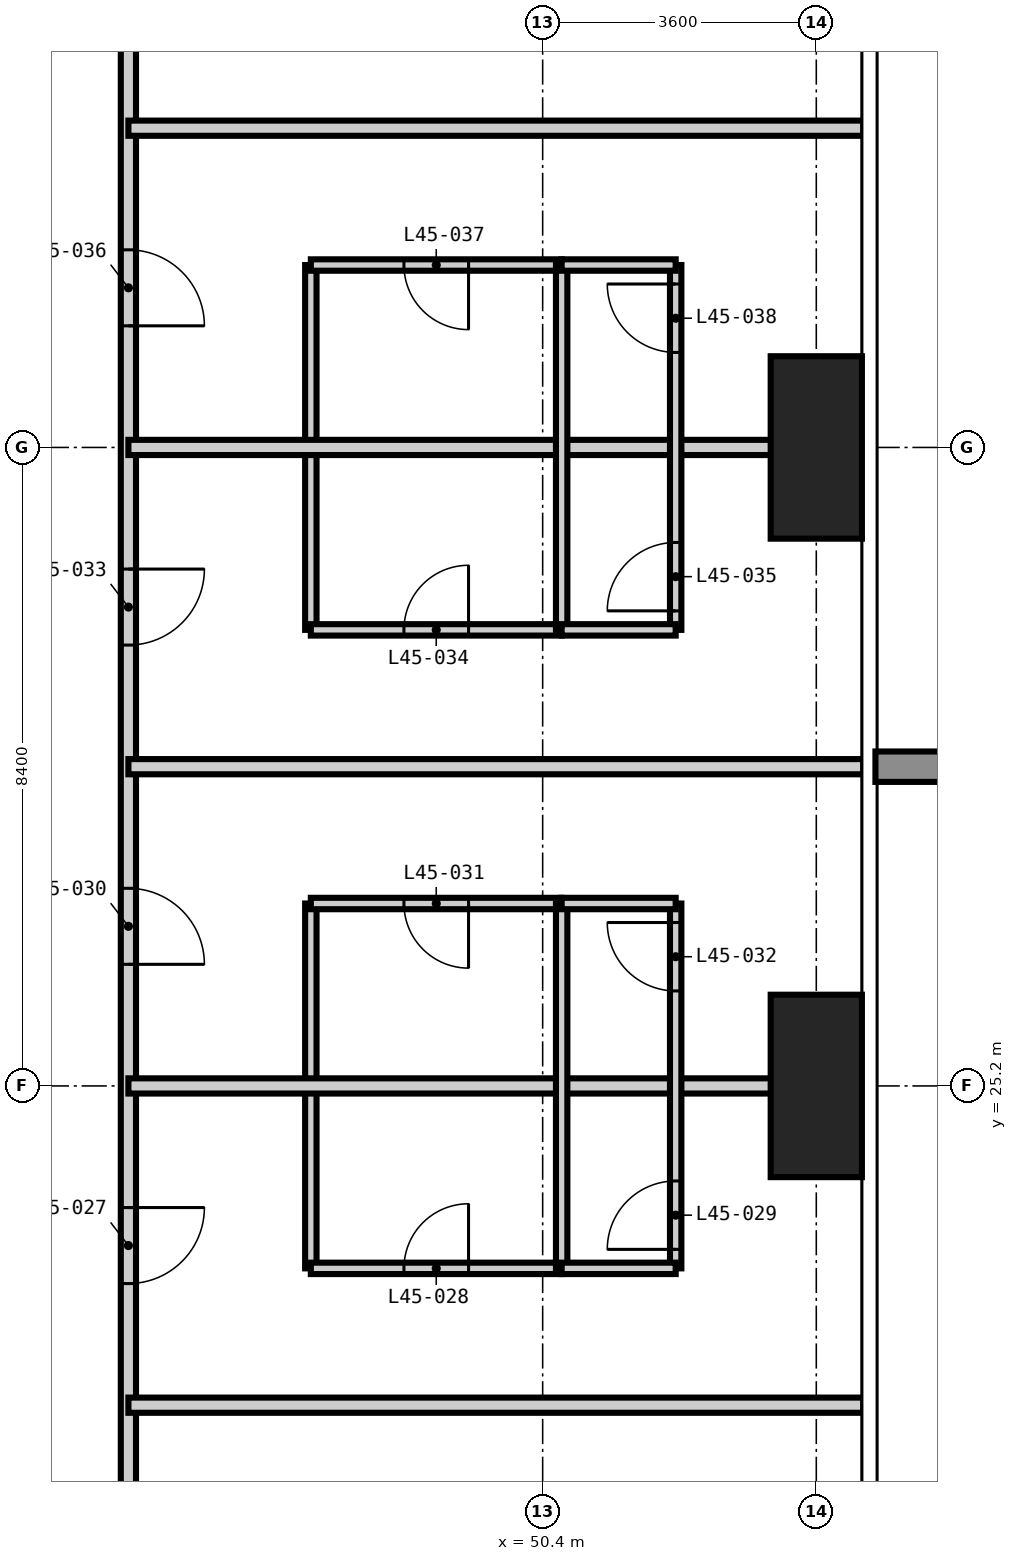
"""IFC4 building model, lengths in metres.
Left out: names, types, materials, properties, quantities, classifications, styles, units other than length and angle.
Written with IfcOpenShell. Run it as: python <this file> out.ifc"""

import sys

from ifc_helpers import new_model, si_unit, direction, frame, frame_2d, origin, origin_2d, place, context, subcontext, project, spatial, rectangle, extrude, element, fill, save


model = new_model("IFC4")
c1 = context("Model", 3, precision=1e-05, world=origin(), true_north=direction((0.0, 1.0)))
c2 = subcontext(c1, "Body", "Model", "MODEL_VIEW")
j1 = project(units=[si_unit("LENGTHUNIT", "METRE"), si_unit("PLANEANGLEUNIT", "RADIAN")], contexts=[c1])
p1 = place(None, origin())
s1 = spatial("IfcSite", under=j1, at=p1, CompositionType="ELEMENT")
p2 = place(p1, origin())
s2 = spatial("IfcBuilding", under=s1, at=p2, CompositionType="ELEMENT")
p3 = place(p2, frame((0.0, 0.0, 177.0)))
s3 = spatial("IfcBuildingStorey", under=s2, at=p3, CompositionType="ELEMENT", Elevation=177.0)
for number, where, z_axis, x_axis in (
    (1, (54.0, 25.2, -0.35), (0.0, 0.0, 1.0), (1.0, 0.0, 0.0)),
    (2, (54.0, 33.6, -0.35), (0.0, 0.0, 1.0), (1.0, 0.0, 0.0)),
):
    element("IfcColumn", number, at=place(p3, frame(where, z_axis=z_axis, x_axis=x_axis)), inside=s3, PredefinedType="COLUMN", context=c2, shape_type="SweptSolid", body=[
        extrude(rectangle(XDim=1.2, YDim=2.4, at=origin_2d()), origin(), (0.0, 0.0, 1.0), 3.6),
    ])
for number, where, z_axis, x_axis in (
    (3, (47.35, 22.8, 0.0), (0.0, 0.0, 1.0), (0.0, 1.0, 0.0)),
    (4, (47.35, 31.2, 0.0), (0.0, 0.0, 1.0), (0.0, 1.0, 0.0)),
):
    element("IfcWall", number, at=place(p3, frame(where, z_axis=z_axis, x_axis=x_axis)), inside=s3, PredefinedType="PARTITIONING", context=c2, shape_type="SweptSolid", body=[
        extrude(rectangle(XDim=4.8, YDim=0.15, at=frame_2d((2.4, 0.0))), origin(), (0.0, 0.0, 1.0), 3.25),
    ])
p4 = place(p3, frame((47.35, 22.8, 0.0), z_axis=(0.0, 0.0, 1.0), x_axis=(1.0, 0.0, 0.0)))
e5 = element("IfcWall", 5, at=p4, inside=s3, PredefinedType="PARTITIONING", context=c2, shape_type="SweptSolid", body=[
    extrude(rectangle(XDim=3.3, YDim=0.15, at=frame_2d((1.65, 0.0))), origin(), (0.0, 0.0, 1.0), 3.25),
])
p5 = place(p4, frame((1.225, 0.0, 0.0)))
e6 = element("IfcOpeningElement", 6, at=p5, cuts=e5, PredefinedType="OPENING", context=c2, shape_type="SweptSolid", body=[
    extrude(rectangle(XDim=0.85, YDim=2.1, at=frame_2d((0.425, 1.05))), frame((0.0, 0.085, 0.0), z_axis=(0.0, -1.0, 0.0), x_axis=(1.0, 0.0, 0.0)), (0.0, 0.0, 1.0), 0.17),
])
p6 = place(p3, frame((47.35, 27.6, 0.0), z_axis=(0.0, 0.0, 1.0), x_axis=(1.0, 0.0, 0.0)))
e7 = element("IfcWall", 7, at=p6, inside=s3, PredefinedType="PARTITIONING", context=c2, shape_type="SweptSolid", body=[
    extrude(rectangle(XDim=3.3, YDim=0.15, at=frame_2d((1.65, 0.0))), origin(), (0.0, 0.0, 1.0), 3.25),
])
p7 = place(p6, frame((1.225, 0.0, 0.0)))
e8 = element("IfcOpeningElement", 8, at=p7, cuts=e7, PredefinedType="OPENING", context=c2, shape_type="SweptSolid", body=[
    extrude(rectangle(XDim=0.85, YDim=2.1, at=frame_2d((0.425, 1.05))), frame((0.0, 0.085, 0.0), z_axis=(0.0, -1.0, 0.0), x_axis=(1.0, 0.0, 0.0)), (0.0, 0.0, 1.0), 0.17),
])
p8 = place(p3, frame((47.35, 31.2, 0.0), z_axis=(0.0, 0.0, 1.0), x_axis=(1.0, 0.0, 0.0)))
e9 = element("IfcWall", 9, at=p8, inside=s3, PredefinedType="PARTITIONING", context=c2, shape_type="SweptSolid", body=[
    extrude(rectangle(XDim=3.3, YDim=0.15, at=frame_2d((1.65, 0.0))), origin(), (0.0, 0.0, 1.0), 3.25),
])
p9 = place(p8, frame((1.225, 0.0, 0.0)))
e10 = element("IfcOpeningElement", 10, at=p9, cuts=e9, PredefinedType="OPENING", context=c2, shape_type="SweptSolid", body=[
    extrude(rectangle(XDim=0.85, YDim=2.1, at=frame_2d((0.425, 1.05))), frame((0.0, 0.085, 0.0), z_axis=(0.0, -1.0, 0.0), x_axis=(1.0, 0.0, 0.0)), (0.0, 0.0, 1.0), 0.17),
])
p10 = place(p3, frame((47.35, 36.0, 0.0), z_axis=(0.0, 0.0, 1.0), x_axis=(1.0, 0.0, 0.0)))
e11 = element("IfcWall", 11, at=p10, inside=s3, PredefinedType="PARTITIONING", context=c2, shape_type="SweptSolid", body=[
    extrude(rectangle(XDim=3.3, YDim=0.15, at=frame_2d((1.65, 0.0))), origin(), (0.0, 0.0, 1.0), 3.25),
])
p11 = place(p10, frame((1.225, 0.0, 0.0)))
e12 = element("IfcOpeningElement", 12, at=p11, cuts=e11, PredefinedType="OPENING", context=c2, shape_type="SweptSolid", body=[
    extrude(rectangle(XDim=0.85, YDim=2.1, at=frame_2d((0.425, 1.05))), frame((0.0, 0.085, 0.0), z_axis=(0.0, -1.0, 0.0), x_axis=(1.0, 0.0, 0.0)), (0.0, 0.0, 1.0), 0.17),
])
p12 = place(p3, frame((44.95, 45.55, 0.0), z_axis=(0.0, 0.0, 1.0), x_axis=(0.0, -1.0, 0.0)))
e13 = element("IfcWall", 13, at=p12, inside=s3, PredefinedType="PARTITIONING", context=c2, shape_type="SweptSolid", body=[
    extrude(rectangle(XDim=31.1, YDim=0.2, at=frame_2d((15.55, 0.0))), origin(), (0.0, 0.0, 1.0), 3.25),
])
p13 = place(p12, frame((26.15, 0.0, 0.0)))
e14 = element("IfcOpeningElement", 14, at=p13, cuts=e13, PredefinedType="OPENING", context=c2, shape_type="SweptSolid", body=[
    extrude(rectangle(XDim=1.0, YDim=2.2, at=frame_2d((0.5, 1.1))), frame((0.0, 0.11, 0.0), z_axis=(0.0, -1.0, 0.0), x_axis=(1.0, 0.0, 0.0)), (0.0, 0.0, 1.0), 0.22),
])
p14 = place(p12, frame((21.95, 0.0, 0.0)))
e15 = element("IfcOpeningElement", 15, at=p14, cuts=e13, PredefinedType="OPENING", context=c2, shape_type="SweptSolid", body=[
    extrude(rectangle(XDim=1.0, YDim=2.2, at=frame_2d((0.5, 1.1))), frame((0.0, 0.11, 0.0), z_axis=(0.0, -1.0, 0.0), x_axis=(1.0, 0.0, 0.0)), (0.0, 0.0, 1.0), 0.22),
])
p15 = place(p12, frame((17.75, 0.0, 0.0)))
e16 = element("IfcOpeningElement", 16, at=p15, cuts=e13, PredefinedType="OPENING", context=c2, shape_type="SweptSolid", body=[
    extrude(rectangle(XDim=1.0, YDim=2.2, at=frame_2d((0.5, 1.1))), frame((0.0, 0.11, 0.0), z_axis=(0.0, -1.0, 0.0), x_axis=(1.0, 0.0, 0.0)), (0.0, 0.0, 1.0), 0.22),
])
p16 = place(p12, frame((13.55, 0.0, 0.0)))
e17 = element("IfcOpeningElement", 17, at=p16, cuts=e13, PredefinedType="OPENING", context=c2, shape_type="SweptSolid", body=[
    extrude(rectangle(XDim=1.0, YDim=2.2, at=frame_2d((0.5, 1.1))), frame((0.0, 0.11, 0.0), z_axis=(0.0, -1.0, 0.0), x_axis=(1.0, 0.0, 0.0)), (0.0, 0.0, 1.0), 0.22),
])
p17 = place(p12, frame((9.35, 0.0, 0.0)))
e18 = element("IfcOpeningElement", 18, at=p17, cuts=e13, PredefinedType="OPENING", context=c2, shape_type="SweptSolid", body=[
    extrude(rectangle(XDim=1.0, YDim=2.2, at=frame_2d((0.5, 1.1))), frame((0.0, 0.11, 0.0), z_axis=(0.0, -1.0, 0.0), x_axis=(1.0, 0.0, 0.0)), (0.0, 0.0, 1.0), 0.22),
])
p18 = place(p12, frame((5.15, 0.0, 0.0)))
e19 = element("IfcOpeningElement", 19, at=p18, cuts=e13, PredefinedType="OPENING", context=c2, shape_type="SweptSolid", body=[
    extrude(rectangle(XDim=1.0, YDim=2.2, at=frame_2d((0.5, 1.1))), frame((0.0, 0.11, 0.0), z_axis=(0.0, -1.0, 0.0), x_axis=(1.0, 0.0, 0.0)), (0.0, 0.0, 1.0), 0.22),
])
p19 = place(p12, frame((29.425, 0.0, 0.0)))
e20 = element("IfcOpeningElement", 20, at=p19, cuts=e13, PredefinedType="OPENING", context=c2, shape_type="SweptSolid", body=[
    extrude(rectangle(XDim=1.0, YDim=2.2, at=frame_2d((0.5, 1.1))), frame((0.0, 0.11, 0.0), z_axis=(0.0, -1.0, 0.0), x_axis=(1.0, 0.0, 0.0)), (0.0, 0.0, 1.0), 0.22),
])
p20 = place(p12, frame((1.275, 0.0, 0.0)))
e21 = element("IfcOpeningElement", 21, at=p20, cuts=e13, PredefinedType="OPENING", context=c2, shape_type="SweptSolid", body=[
    extrude(rectangle(XDim=1.0, YDim=2.2, at=frame_2d((0.5, 1.1))), frame((0.0, 0.11, 0.0), z_axis=(0.0, -1.0, 0.0), x_axis=(1.0, 0.0, 0.0)), (0.0, 0.0, 1.0), 0.22),
])
for number, where, z_axis, x_axis in (
    (22, (44.95, 21.0, 0.0), (0.0, 0.0, 1.0), (1.0, 0.0, 0.0)),
    (23, (44.95, 25.2, 0.0), (0.0, 0.0, 1.0), (1.0, 0.0, 0.0)),
    (24, (44.95, 29.4, 0.0), (0.0, 0.0, 1.0), (1.0, 0.0, 0.0)),
    (25, (44.95, 33.6, 0.0), (0.0, 0.0, 1.0), (1.0, 0.0, 0.0)),
    (26, (44.95, 37.8, 0.0), (0.0, 0.0, 1.0), (1.0, 0.0, 0.0)),
):
    element("IfcWall", number, at=place(p3, frame(where, z_axis=z_axis, x_axis=x_axis)), inside=s3, PredefinedType="PARTITIONING", context=c2, shape_type="SweptSolid", body=[
        extrude(rectangle(XDim=9.668, YDim=0.2, at=frame_2d((4.834, 0.0))), origin(), (0.0, 0.0, 1.0), 3.25),
    ])
for number, where, z_axis, x_axis in (
    (27, (50.65, 22.8, 0.0), (0.0, 0.0, 1.0), (0.0, 1.0, 0.0)),
    (28, (50.65, 31.2, 0.0), (0.0, 0.0, 1.0), (0.0, 1.0, 0.0)),
):
    element("IfcWall", number, at=place(p3, frame(where, z_axis=z_axis, x_axis=x_axis)), inside=s3, PredefinedType="PARTITIONING", context=c2, shape_type="SweptSolid", body=[
        extrude(rectangle(XDim=4.8, YDim=0.15, at=frame_2d((2.4, 0.0))), origin(), (0.0, 0.0, 1.0), 3.25),
    ])
p21 = place(p3, frame((52.15, 22.8, 0.0), z_axis=(0.0, 0.0, 1.0), x_axis=(0.0, 1.0, 0.0)))
e29 = element("IfcWall", 29, at=p21, inside=s3, PredefinedType="PARTITIONING", context=c2, shape_type="SweptSolid", body=[
    extrude(rectangle(XDim=4.8, YDim=0.15, at=frame_2d((2.4, 0.0))), origin(), (0.0, 0.0, 1.0), 3.25),
])
p22 = place(p21, frame((0.25, 0.0, 0.0)))
e30 = element("IfcOpeningElement", 30, at=p22, cuts=e29, PredefinedType="OPENING", context=c2, shape_type="SweptSolid", body=[
    extrude(rectangle(XDim=0.9, YDim=2.1, at=frame_2d((0.45, 1.05))), frame((0.0, 0.085, 0.0), z_axis=(0.0, -1.0, 0.0), x_axis=(1.0, 0.0, 0.0)), (0.0, 0.0, 1.0), 0.17),
])
p23 = place(p21, frame((3.65, 0.0, 0.0)))
e31 = element("IfcOpeningElement", 31, at=p23, cuts=e29, PredefinedType="OPENING", context=c2, shape_type="SweptSolid", body=[
    extrude(rectangle(XDim=0.9, YDim=2.1, at=frame_2d((0.45, 1.05))), frame((0.0, 0.085, 0.0), z_axis=(0.0, -1.0, 0.0), x_axis=(1.0, 0.0, 0.0)), (0.0, 0.0, 1.0), 0.17),
])
p24 = place(p3, frame((52.15, 31.2, 0.0), z_axis=(0.0, 0.0, 1.0), x_axis=(0.0, 1.0, 0.0)))
e32 = element("IfcWall", 32, at=p24, inside=s3, PredefinedType="PARTITIONING", context=c2, shape_type="SweptSolid", body=[
    extrude(rectangle(XDim=4.8, YDim=0.15, at=frame_2d((2.4, 0.0))), origin(), (0.0, 0.0, 1.0), 3.25),
])
p25 = place(p24, frame((0.25, 0.0, 0.0)))
e33 = element("IfcOpeningElement", 33, at=p25, cuts=e32, PredefinedType="OPENING", context=c2, shape_type="SweptSolid", body=[
    extrude(rectangle(XDim=0.9, YDim=2.1, at=frame_2d((0.45, 1.05))), frame((0.0, 0.085, 0.0), z_axis=(0.0, -1.0, 0.0), x_axis=(1.0, 0.0, 0.0)), (0.0, 0.0, 1.0), 0.17),
])
p26 = place(p24, frame((3.65, 0.0, 0.0)))
e34 = element("IfcOpeningElement", 34, at=p26, cuts=e32, PredefinedType="OPENING", context=c2, shape_type="SweptSolid", body=[
    extrude(rectangle(XDim=0.9, YDim=2.1, at=frame_2d((0.45, 1.05))), frame((0.0, 0.085, 0.0), z_axis=(0.0, -1.0, 0.0), x_axis=(1.0, 0.0, 0.0)), (0.0, 0.0, 1.0), 0.17),
])
for number, where, z_axis, x_axis in (
    (35, (50.65, 22.8, 0.0), (0.0, 0.0, 1.0), (1.0, 0.0, 0.0)),
    (36, (50.65, 27.6, 0.0), (0.0, 0.0, 1.0), (1.0, 0.0, 0.0)),
    (37, (50.65, 31.2, 0.0), (0.0, 0.0, 1.0), (1.0, 0.0, 0.0)),
    (38, (50.65, 36.0, 0.0), (0.0, 0.0, 1.0), (1.0, 0.0, 0.0)),
):
    element("IfcWall", number, at=place(p3, frame(where, z_axis=z_axis, x_axis=x_axis)), inside=s3, PredefinedType="PARTITIONING", context=c2, shape_type="SweptSolid", body=[
        extrude(rectangle(XDim=1.5, YDim=0.15, at=frame_2d((0.75, 0.0))), origin(), (0.0, 0.0, 1.0), 3.25),
    ])
p27 = place(p14, origin())
e39 = element("IfcDoor", 39, at=p27, inside=s3, OperationType="SINGLE_SWING_LEFT", PredefinedType="DOOR", context=c2, shape_type="SweptSolid", body=[
    extrude(rectangle(XDim=1.0, YDim=2.2, at=frame_2d((0.5, 1.1))), frame((0.0, 0.025, 0.0), z_axis=(0.0, -1.0, 0.0), x_axis=(1.0, 0.0, 0.0)), (0.0, 0.0, 1.0), 0.05),
])
fill(e15, e39)
p28 = place(p5, origin())
e40 = element("IfcDoor", 40, at=p28, inside=s3, OperationType="SINGLE_SWING_RIGHT", PredefinedType="DOOR", context=c2, shape_type="SweptSolid", body=[
    extrude(rectangle(XDim=0.85, YDim=2.1, at=frame_2d((0.425, 1.05))), frame((0.0, 0.025, 0.0), z_axis=(0.0, -1.0, 0.0), x_axis=(1.0, 0.0, 0.0)), (0.0, 0.0, 1.0), 0.05),
])
fill(e6, e40)
p29 = place(p22, origin())
e41 = element("IfcDoor", 41, at=p29, inside=s3, OperationType="SINGLE_SWING_LEFT", PredefinedType="DOOR", context=c2, shape_type="SweptSolid", body=[
    extrude(rectangle(XDim=0.9, YDim=2.1, at=frame_2d((0.45, 1.05))), frame((0.0, 0.025, 0.0), z_axis=(0.0, -1.0, 0.0), x_axis=(1.0, 0.0, 0.0)), (0.0, 0.0, 1.0), 0.05),
])
fill(e30, e41)
p30 = place(p15, origin())
e42 = element("IfcDoor", 42, at=p30, inside=s3, OperationType="SINGLE_SWING_RIGHT", PredefinedType="DOOR", context=c2, shape_type="SweptSolid", body=[
    extrude(rectangle(XDim=1.0, YDim=2.2, at=frame_2d((0.5, 1.1))), frame((0.0, 0.025, 0.0), z_axis=(0.0, -1.0, 0.0), x_axis=(1.0, 0.0, 0.0)), (0.0, 0.0, 1.0), 0.05),
])
fill(e16, e42)
p31 = place(p7, frame((0.85, 0.0, 0.0), z_axis=(0.0, 0.0, 1.0), x_axis=(-1.0, 0.0, 0.0)))
e43 = element("IfcDoor", 43, at=p31, inside=s3, OperationType="SINGLE_SWING_LEFT", PredefinedType="DOOR", context=c2, shape_type="SweptSolid", body=[
    extrude(rectangle(XDim=0.85, YDim=2.1, at=frame_2d((0.425, 1.05))), frame((0.0, 0.025, 0.0), z_axis=(0.0, -1.0, 0.0), x_axis=(1.0, 0.0, 0.0)), (0.0, 0.0, 1.0), 0.05),
])
fill(e8, e43)
p32 = place(p23, origin())
e44 = element("IfcDoor", 44, at=p32, inside=s3, OperationType="SINGLE_SWING_RIGHT", PredefinedType="DOOR", context=c2, shape_type="SweptSolid", body=[
    extrude(rectangle(XDim=0.9, YDim=2.1, at=frame_2d((0.45, 1.05))), frame((0.0, 0.025, 0.0), z_axis=(0.0, -1.0, 0.0), x_axis=(1.0, 0.0, 0.0)), (0.0, 0.0, 1.0), 0.05),
])
fill(e31, e44)
p33 = place(p16, origin())
e45 = element("IfcDoor", 45, at=p33, inside=s3, OperationType="SINGLE_SWING_LEFT", PredefinedType="DOOR", context=c2, shape_type="SweptSolid", body=[
    extrude(rectangle(XDim=1.0, YDim=2.2, at=frame_2d((0.5, 1.1))), frame((0.0, 0.025, 0.0), z_axis=(0.0, -1.0, 0.0), x_axis=(1.0, 0.0, 0.0)), (0.0, 0.0, 1.0), 0.05),
])
fill(e17, e45)
p34 = place(p9, origin())
e46 = element("IfcDoor", 46, at=p34, inside=s3, OperationType="SINGLE_SWING_RIGHT", PredefinedType="DOOR", context=c2, shape_type="SweptSolid", body=[
    extrude(rectangle(XDim=0.85, YDim=2.1, at=frame_2d((0.425, 1.05))), frame((0.0, 0.025, 0.0), z_axis=(0.0, -1.0, 0.0), x_axis=(1.0, 0.0, 0.0)), (0.0, 0.0, 1.0), 0.05),
])
fill(e10, e46)
p35 = place(p25, origin())
e47 = element("IfcDoor", 47, at=p35, inside=s3, OperationType="SINGLE_SWING_LEFT", PredefinedType="DOOR", context=c2, shape_type="SweptSolid", body=[
    extrude(rectangle(XDim=0.9, YDim=2.1, at=frame_2d((0.45, 1.05))), frame((0.0, 0.025, 0.0), z_axis=(0.0, -1.0, 0.0), x_axis=(1.0, 0.0, 0.0)), (0.0, 0.0, 1.0), 0.05),
])
fill(e33, e47)
p36 = place(p17, origin())
e48 = element("IfcDoor", 48, at=p36, inside=s3, OperationType="SINGLE_SWING_RIGHT", PredefinedType="DOOR", context=c2, shape_type="SweptSolid", body=[
    extrude(rectangle(XDim=1.0, YDim=2.2, at=frame_2d((0.5, 1.1))), frame((0.0, 0.025, 0.0), z_axis=(0.0, -1.0, 0.0), x_axis=(1.0, 0.0, 0.0)), (0.0, 0.0, 1.0), 0.05),
])
fill(e18, e48)
p37 = place(p11, frame((0.85, 0.0, 0.0), z_axis=(0.0, 0.0, 1.0), x_axis=(-1.0, 0.0, 0.0)))
e49 = element("IfcDoor", 49, at=p37, inside=s3, OperationType="SINGLE_SWING_LEFT", PredefinedType="DOOR", context=c2, shape_type="SweptSolid", body=[
    extrude(rectangle(XDim=0.85, YDim=2.1, at=frame_2d((0.425, 1.05))), frame((0.0, 0.025, 0.0), z_axis=(0.0, -1.0, 0.0), x_axis=(1.0, 0.0, 0.0)), (0.0, 0.0, 1.0), 0.05),
])
fill(e12, e49)
p38 = place(p26, origin())
e50 = element("IfcDoor", 50, at=p38, inside=s3, OperationType="SINGLE_SWING_RIGHT", PredefinedType="DOOR", context=c2, shape_type="SweptSolid", body=[
    extrude(rectangle(XDim=0.9, YDim=2.1, at=frame_2d((0.45, 1.05))), frame((0.0, 0.025, 0.0), z_axis=(0.0, -1.0, 0.0), x_axis=(1.0, 0.0, 0.0)), (0.0, 0.0, 1.0), 0.05),
])
fill(e34, e50)
save(model, sys.argv[1])
